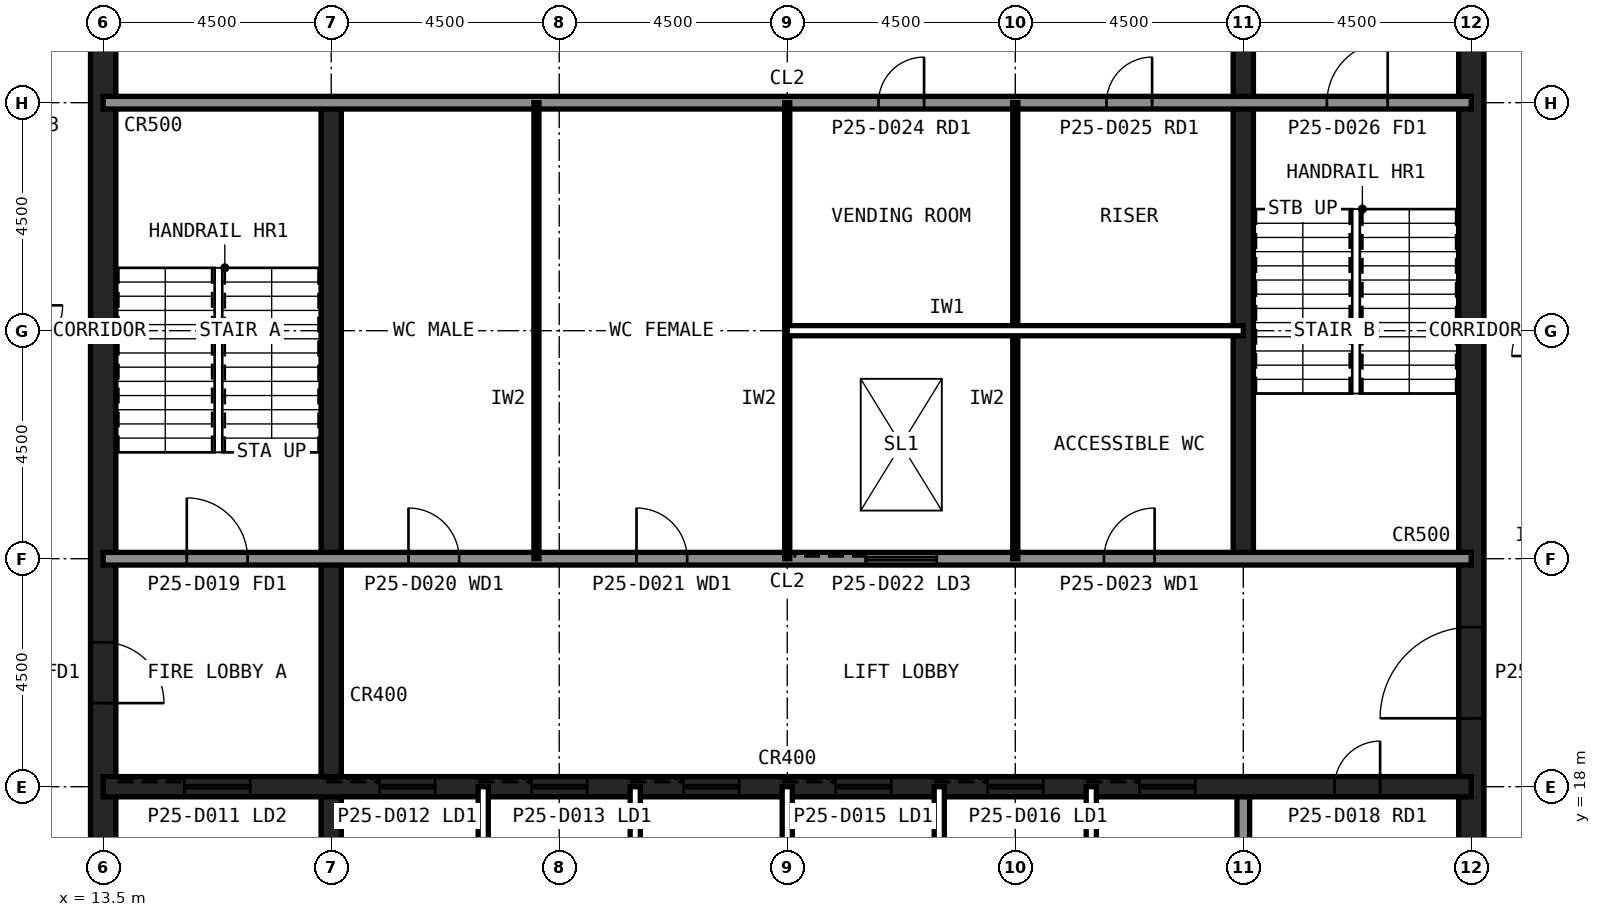
"""IFC4 building model, lengths in metres.
Left out: names, types, materials, properties, quantities, classifications, styles, units other than length and angle.
Written with IfcOpenShell. Run it as: python <this file> out.ifc"""

import sys

from ifc_helpers import new_model, si_unit, direction, frame, frame_2d, origin, place, context, subcontext, project, spatial, rectangle, extrude, element, fill, save


model = new_model("IFC4")
c1 = context("Model", 3, precision=1e-05, world=origin(), true_north=direction((0.0, 1.0)))
c2 = subcontext(c1, "Body", "Model", "MODEL_VIEW")
j1 = project(units=[si_unit("LENGTHUNIT", "METRE"), si_unit("PLANEANGLEUNIT", "RADIAN")], contexts=[c1])
p1 = place(None, origin())
s1 = spatial("IfcSite", under=j1, at=p1, CompositionType="ELEMENT")
p2 = place(p1, origin())
s2 = spatial("IfcBuilding", under=s1, at=p2, CompositionType="ELEMENT")
p3 = place(p2, frame((0.0, 0.0, 110.6)))
s3 = spatial("IfcBuildingStorey", under=s2, at=p3, CompositionType="ELEMENT", Elevation=110.6)
p4 = place(p3, frame((40.5, 13.5, 0.0), z_axis=(0.0, 0.0, 1.0), x_axis=(0.0, 1.0, 0.0)))
e1 = element("IfcWall", 1, at=p4, inside=s3, PredefinedType="SHEAR", context=c2, shape_type="SweptSolid", body=[
    extrude(rectangle(XDim=27.0, YDim=0.5, at=frame_2d((13.5, 0.0))), origin(), (0.0, 0.0, 1.0), 5.0),
])
p5 = place(p4, frame((5.85, 0.0, 0.0)))
e2 = element("IfcOpeningElement", 2, at=p5, cuts=e1, PredefinedType="OPENING", context=c2, shape_type="SweptSolid", body=[
    extrude(rectangle(XDim=1.8, YDim=2.1, at=frame_2d((0.9, 1.05))), frame((0.0, 0.26, 0.0), z_axis=(0.0, -1.0, 0.0), x_axis=(1.0, 0.0, 0.0)), (0.0, 0.0, 1.0), 0.52),
])
p6 = place(p4, frame((19.65, 0.0, 0.0)))
e3 = element("IfcOpeningElement", 3, at=p6, cuts=e1, PredefinedType="OPENING", context=c2, shape_type="SweptSolid", body=[
    extrude(rectangle(XDim=1.2, YDim=2.1, at=frame_2d((0.6, 1.05))), frame((0.0, 0.26, 0.0), z_axis=(0.0, -1.0, 0.0), x_axis=(1.0, 0.0, 0.0)), (0.0, 0.0, 1.0), 0.52),
])
p7 = place(p3, frame((13.5, 40.5, 0.0), z_axis=(0.0, 0.0, 1.0), x_axis=(0.0, -1.0, 0.0)))
e4 = element("IfcWall", 4, at=p7, inside=s3, PredefinedType="SHEAR", context=c2, shape_type="SweptSolid", body=[
    extrude(rectangle(XDim=27.0, YDim=0.5, at=frame_2d((13.5, 0.0))), origin(), (0.0, 0.0, 1.0), 5.0),
])
p8 = place(p7, frame((19.65, 0.0, 0.0)))
e5 = element("IfcOpeningElement", 5, at=p8, cuts=e4, PredefinedType="OPENING", context=c2, shape_type="SweptSolid", body=[
    extrude(rectangle(XDim=1.2, YDim=2.1, at=frame_2d((0.6, 1.05))), frame((0.0, 0.26, 0.0), z_axis=(0.0, -1.0, 0.0), x_axis=(1.0, 0.0, 0.0)), (0.0, 0.0, 1.0), 0.52),
])
p9 = place(p7, frame((5.85, 0.0, 0.0)))
e6 = element("IfcOpeningElement", 6, at=p9, cuts=e4, PredefinedType="OPENING", context=c2, shape_type="SweptSolid", body=[
    extrude(rectangle(XDim=1.8, YDim=2.1, at=frame_2d((0.9, 1.05))), frame((0.0, 0.26, 0.0), z_axis=(0.0, -1.0, 0.0), x_axis=(1.0, 0.0, 0.0)), (0.0, 0.0, 1.0), 0.52),
])
p10 = place(p3, frame((18.0, 13.5, 0.0), z_axis=(0.0, 0.0, 1.0), x_axis=(0.0, 1.0, 0.0)))
e7 = element("IfcWall", 7, at=p10, inside=s3, PredefinedType="SHEAR", context=c2, shape_type="SweptSolid", body=[
    extrude(rectangle(XDim=18.0, YDim=0.4, at=frame_2d((9.0, 0.0))), origin(), (0.0, 0.0, 1.0), 5.0),
])
p11 = place(p3, frame((36.0, 13.5, 0.0), z_axis=(0.0, 0.0, 1.0), x_axis=(0.0, 1.0, 0.0)))
e8 = element("IfcWall", 8, at=p11, inside=s3, PredefinedType="SOLIDWALL", context=c2, shape_type="SweptSolid", body=[
    extrude(rectangle(XDim=4.5, YDim=0.25, at=frame_2d((2.25, 0.0))), origin(), (0.0, 0.0, 1.0), 4.84),
])
p12 = place(p3, frame((36.0, 22.5, 0.0), z_axis=(0.0, 0.0, 1.0), x_axis=(0.0, 1.0, 0.0)))
e9 = element("IfcWall", 9, at=p12, inside=s3, PredefinedType="SHEAR", context=c2, shape_type="SweptSolid", body=[
    extrude(rectangle(XDim=18.0, YDim=0.4, at=frame_2d((9.0, 0.0))), origin(), (0.0, 0.0, 1.0), 5.0),
])
p13 = place(p3, frame((13.5, 18.0, 0.0), z_axis=(0.0, 0.0, 1.0), x_axis=(1.0, 0.0, 0.0)))
e10 = element("IfcWall", 10, at=p13, inside=s3, PredefinedType="SHEAR", context=c2, shape_type="SweptSolid", body=[
    extrude(rectangle(XDim=27.0, YDim=0.4, at=frame_2d((13.5, 0.0))), origin(), (0.0, 0.0, 1.0), 5.0),
])
p14 = place(p13, frame((24.3, 0.0, 0.0)))
e11 = element("IfcOpeningElement", 11, at=p14, cuts=e10, PredefinedType="OPENING", context=c2, shape_type="SweptSolid", body=[
    extrude(rectangle(XDim=0.9, YDim=2.1, at=frame_2d((0.45, 1.05))), frame((0.0, 0.21, 0.0), z_axis=(0.0, -1.0, 0.0), x_axis=(1.0, 0.0, 0.0)), (0.0, 0.0, 1.0), 0.42),
])
p15 = place(p13, frame((5.45, 0.0, 0.0)))
e12 = element("IfcOpeningElement", 12, at=p15, cuts=e10, PredefinedType="OPENING", context=c2, shape_type="SweptSolid", body=[
    extrude(rectangle(XDim=1.1, YDim=2.1, at=frame_2d((0.55, 1.05))), frame((0.0, 0.21, 0.0), z_axis=(0.0, -1.0, 0.0), x_axis=(1.0, 0.0, 0.0)), (0.0, 0.0, 1.0), 0.42),
])
p16 = place(p13, frame((8.45, 0.0, 0.0)))
e13 = element("IfcOpeningElement", 13, at=p16, cuts=e10, PredefinedType="OPENING", context=c2, shape_type="SweptSolid", body=[
    extrude(rectangle(XDim=1.1, YDim=2.1, at=frame_2d((0.55, 1.05))), frame((0.0, 0.21, 0.0), z_axis=(0.0, -1.0, 0.0), x_axis=(1.0, 0.0, 0.0)), (0.0, 0.0, 1.0), 0.42),
])
p17 = place(p13, frame((11.45, 0.0, 0.0)))
e14 = element("IfcOpeningElement", 14, at=p17, cuts=e10, PredefinedType="OPENING", context=c2, shape_type="SweptSolid", body=[
    extrude(rectangle(XDim=1.1, YDim=2.1, at=frame_2d((0.55, 1.05))), frame((0.0, 0.21, 0.0), z_axis=(0.0, -1.0, 0.0), x_axis=(1.0, 0.0, 0.0)), (0.0, 0.0, 1.0), 0.42),
])
p18 = place(p13, frame((14.45, 0.0, 0.0)))
e15 = element("IfcOpeningElement", 15, at=p18, cuts=e10, PredefinedType="OPENING", context=c2, shape_type="SweptSolid", body=[
    extrude(rectangle(XDim=1.1, YDim=2.1, at=frame_2d((0.55, 1.05))), frame((0.0, 0.21, 0.0), z_axis=(0.0, -1.0, 0.0), x_axis=(1.0, 0.0, 0.0)), (0.0, 0.0, 1.0), 0.42),
])
p19 = place(p13, frame((17.45, 0.0, 0.0)))
e16 = element("IfcOpeningElement", 16, at=p19, cuts=e10, PredefinedType="OPENING", context=c2, shape_type="SweptSolid", body=[
    extrude(rectangle(XDim=1.1, YDim=2.1, at=frame_2d((0.55, 1.05))), frame((0.0, 0.21, 0.0), z_axis=(0.0, -1.0, 0.0), x_axis=(1.0, 0.0, 0.0)), (0.0, 0.0, 1.0), 0.42),
])
p20 = place(p13, frame((20.45, 0.0, 0.0)))
e17 = element("IfcOpeningElement", 17, at=p20, cuts=e10, PredefinedType="OPENING", context=c2, shape_type="SweptSolid", body=[
    extrude(rectangle(XDim=1.1, YDim=2.1, at=frame_2d((0.55, 1.05))), frame((0.0, 0.21, 0.0), z_axis=(0.0, -1.0, 0.0), x_axis=(1.0, 0.0, 0.0)), (0.0, 0.0, 1.0), 0.42),
])
p21 = place(p13, frame((1.6, 0.0, 0.0)))
e18 = element("IfcOpeningElement", 18, at=p21, cuts=e10, PredefinedType="OPENING", context=c2, shape_type="SweptSolid", body=[
    extrude(rectangle(XDim=1.3, YDim=2.2, at=frame_2d((0.65, 1.1))), frame((0.0, 0.21, 0.0), z_axis=(0.0, -1.0, 0.0), x_axis=(1.0, 0.0, 0.0)), (0.0, 0.0, 1.0), 0.42),
])
p22 = place(p3, frame((13.5, 22.5, 0.0), z_axis=(0.0, 0.0, 1.0), x_axis=(1.0, 0.0, 0.0)))
e19 = element("IfcWall", 19, at=p22, inside=s3, PredefinedType="SOLIDWALL", context=c2, shape_type="SweptSolid", body=[
    extrude(rectangle(XDim=27.0, YDim=0.25, at=frame_2d((13.5, 0.0))), origin(), (0.0, 0.0, 1.0), 4.84),
])
p23 = place(p22, frame((1.65, 0.0, 0.0)))
e20 = element("IfcOpeningElement", 20, at=p23, cuts=e19, PredefinedType="OPENING", context=c2, shape_type="SweptSolid", body=[
    extrude(rectangle(XDim=1.2, YDim=2.1, at=frame_2d((0.6, 1.05))), frame((0.0, 0.135, 0.0), z_axis=(0.0, -1.0, 0.0), x_axis=(1.0, 0.0, 0.0)), (0.0, 0.0, 1.0), 0.27),
])
p24 = place(p22, frame((6.025, 0.0, 0.0)))
e21 = element("IfcOpeningElement", 21, at=p24, cuts=e19, PredefinedType="OPENING", context=c2, shape_type="SweptSolid", body=[
    extrude(rectangle(XDim=1.0, YDim=2.1, at=frame_2d((0.5, 1.05))), frame((0.0, 0.135, 0.0), z_axis=(0.0, -1.0, 0.0), x_axis=(1.0, 0.0, 0.0)), (0.0, 0.0, 1.0), 0.27),
])
p25 = place(p22, frame((10.525, 0.0, 0.0)))
e22 = element("IfcOpeningElement", 22, at=p25, cuts=e19, PredefinedType="OPENING", context=c2, shape_type="SweptSolid", body=[
    extrude(rectangle(XDim=1.0, YDim=2.1, at=frame_2d((0.5, 1.05))), frame((0.0, 0.135, 0.0), z_axis=(0.0, -1.0, 0.0), x_axis=(1.0, 0.0, 0.0)), (0.0, 0.0, 1.0), 0.27),
])
p26 = place(p22, frame((19.75, 0.0, 0.0)))
e23 = element("IfcOpeningElement", 23, at=p26, cuts=e19, PredefinedType="OPENING", context=c2, shape_type="SweptSolid", body=[
    extrude(rectangle(XDim=1.0, YDim=2.1, at=frame_2d((0.5, 1.05))), frame((0.0, 0.135, 0.0), z_axis=(0.0, -1.0, 0.0), x_axis=(1.0, 0.0, 0.0)), (0.0, 0.0, 1.0), 0.27),
])
p27 = place(p22, frame((15.05, 0.0, 0.0)))
e24 = element("IfcOpeningElement", 24, at=p27, cuts=e19, PredefinedType="OPENING", context=c2, shape_type="SweptSolid", body=[
    extrude(rectangle(XDim=1.4, YDim=2.4, at=frame_2d((0.7, 1.2))), frame((0.0, 0.135, 0.0), z_axis=(0.0, -1.0, 0.0), x_axis=(1.0, 0.0, 0.0)), (0.0, 0.0, 1.0), 0.27),
])
p28 = place(p3, frame((13.5, 31.5, 0.0), z_axis=(0.0, 0.0, 1.0), x_axis=(1.0, 0.0, 0.0)))
e25 = element("IfcWall", 25, at=p28, inside=s3, PredefinedType="SOLIDWALL", context=c2, shape_type="SweptSolid", body=[
    extrude(rectangle(XDim=27.0, YDim=0.25, at=frame_2d((13.5, 0.0))), origin(), (0.0, 0.0, 1.0), 4.84),
])
p29 = place(p28, frame((24.15, 0.0, 0.0)))
e26 = element("IfcOpeningElement", 26, at=p29, cuts=e25, PredefinedType="OPENING", context=c2, shape_type="SweptSolid", body=[
    extrude(rectangle(XDim=1.2, YDim=2.1, at=frame_2d((0.6, 1.05))), frame((0.0, 0.135, 0.0), z_axis=(0.0, -1.0, 0.0), x_axis=(1.0, 0.0, 0.0)), (0.0, 0.0, 1.0), 0.27),
])
p30 = place(p28, frame((15.3, 0.0, 0.0)))
e27 = element("IfcOpeningElement", 27, at=p30, cuts=e25, PredefinedType="OPENING", context=c2, shape_type="SweptSolid", body=[
    extrude(rectangle(XDim=0.9, YDim=2.1, at=frame_2d((0.45, 1.05))), frame((0.0, 0.135, 0.0), z_axis=(0.0, -1.0, 0.0), x_axis=(1.0, 0.0, 0.0)), (0.0, 0.0, 1.0), 0.27),
])
p31 = place(p28, frame((19.8, 0.0, 0.0)))
e28 = element("IfcOpeningElement", 28, at=p31, cuts=e25, PredefinedType="OPENING", context=c2, shape_type="SweptSolid", body=[
    extrude(rectangle(XDim=0.9, YDim=2.1, at=frame_2d((0.45, 1.05))), frame((0.0, 0.135, 0.0), z_axis=(0.0, -1.0, 0.0), x_axis=(1.0, 0.0, 0.0)), (0.0, 0.0, 1.0), 0.27),
])
for number, where, z_axis, x_axis in (
    (29, (21.0, 13.5, 0.0), (0.0, 0.0, 1.0), (0.0, 1.0, 0.0)),
    (30, (24.0, 13.5, 0.0), (0.0, 0.0, 1.0), (0.0, 1.0, 0.0)),
    (31, (27.0, 13.5, 0.0), (0.0, 0.0, 1.0), (0.0, 1.0, 0.0)),
    (32, (30.0, 13.5, 0.0), (0.0, 0.0, 1.0), (0.0, 1.0, 0.0)),
    (33, (33.0, 13.5, 0.0), (0.0, 0.0, 1.0), (0.0, 1.0, 0.0)),
):
    element("IfcWall", number, at=place(p3, frame(where, z_axis=z_axis, x_axis=x_axis)), inside=s3, PredefinedType="PARTITIONING", context=c2, shape_type="SweptSolid", body=[
        extrude(rectangle(XDim=4.5, YDim=0.2, at=frame_2d((2.25, 0.0))), origin(), (0.0, 0.0, 1.0), 4.84),
    ])
for number, where, z_axis, x_axis in (
    (34, (22.05, 22.5, 0.0), (0.0, 0.0, 1.0), (0.0, 1.0, 0.0)),
    (35, (27.0, 22.5, 0.0), (0.0, 0.0, 1.0), (0.0, 1.0, 0.0)),
    (36, (31.5, 22.5, 0.0), (0.0, 0.0, 1.0), (0.0, 1.0, 0.0)),
):
    element("IfcWall", number, at=place(p3, frame(where, z_axis=z_axis, x_axis=x_axis)), inside=s3, PredefinedType="PLUMBINGWALL", context=c2, shape_type="SweptSolid", body=[
        extrude(rectangle(XDim=9.0, YDim=0.1, at=frame_2d((4.5, 0.0))), origin(), (0.0, 0.0, 1.0), 4.84),
    ])
p32 = place(p3, frame((27.0, 27.0, 0.0), z_axis=(0.0, 0.0, 1.0), x_axis=(1.0, 0.0, 0.0)))
e37 = element("IfcWall", 37, at=p32, inside=s3, PredefinedType="PARTITIONING", context=c2, shape_type="SweptSolid", body=[
    extrude(rectangle(XDim=9.0, YDim=0.2, at=frame_2d((4.5, 0.0))), origin(), (0.0, 0.0, 1.0), 4.84),
])
p33 = place(p8, origin())
e38 = element("IfcDoor", 38, at=p33, inside=s3, OperationType="SINGLE_SWING_RIGHT", PredefinedType="DOOR", context=c2, shape_type="SweptSolid", body=[
    extrude(rectangle(XDim=1.2, YDim=2.1, at=frame_2d((0.6, 1.05))), frame((0.0, 0.025, 0.0), z_axis=(0.0, -1.0, 0.0), x_axis=(1.0, 0.0, 0.0)), (0.0, 0.0, 1.0), 0.05),
])
fill(e5, e38)
p34 = place(p5, origin())
e39 = element("IfcDoor", 39, at=p34, inside=s3, OperationType="SINGLE_SWING_LEFT", PredefinedType="DOOR", context=c2, shape_type="SweptSolid", body=[
    extrude(rectangle(XDim=1.8, YDim=2.1, at=frame_2d((0.9, 1.05))), frame((0.0, 0.025, 0.0), z_axis=(0.0, -1.0, 0.0), x_axis=(1.0, 0.0, 0.0)), (0.0, 0.0, 1.0), 0.05),
])
fill(e2, e39)
p35 = place(p23, origin())
e40 = element("IfcDoor", 40, at=p35, inside=s3, OperationType="SINGLE_SWING_LEFT", PredefinedType="DOOR", context=c2, shape_type="SweptSolid", body=[
    extrude(rectangle(XDim=1.2, YDim=2.1, at=frame_2d((0.6, 1.05))), frame((0.0, 0.025, 0.0), z_axis=(0.0, -1.0, 0.0), x_axis=(1.0, 0.0, 0.0)), (0.0, 0.0, 1.0), 0.05),
])
fill(e20, e40)
p36 = place(p29, origin())
e41 = element("IfcDoor", 41, at=p36, inside=s3, OperationType="SINGLE_SWING_RIGHT", PredefinedType="DOOR", context=c2, shape_type="SweptSolid", body=[
    extrude(rectangle(XDim=1.2, YDim=2.1, at=frame_2d((0.6, 1.05))), frame((0.0, 0.025, 0.0), z_axis=(0.0, -1.0, 0.0), x_axis=(1.0, 0.0, 0.0)), (0.0, 0.0, 1.0), 0.05),
])
fill(e26, e41)
p37 = place(p24, origin())
e42 = element("IfcDoor", 42, at=p37, inside=s3, OperationType="SINGLE_SWING_LEFT", PredefinedType="DOOR", context=c2, shape_type="SweptSolid", body=[
    extrude(rectangle(XDim=1.0, YDim=2.1, at=frame_2d((0.5, 1.05))), frame((0.0, 0.025, 0.0), z_axis=(0.0, -1.0, 0.0), x_axis=(1.0, 0.0, 0.0)), (0.0, 0.0, 1.0), 0.05),
])
fill(e21, e42)
p38 = place(p25, origin())
e43 = element("IfcDoor", 43, at=p38, inside=s3, OperationType="SINGLE_SWING_LEFT", PredefinedType="DOOR", context=c2, shape_type="SweptSolid", body=[
    extrude(rectangle(XDim=1.0, YDim=2.1, at=frame_2d((0.5, 1.05))), frame((0.0, 0.025, 0.0), z_axis=(0.0, -1.0, 0.0), x_axis=(1.0, 0.0, 0.0)), (0.0, 0.0, 1.0), 0.05),
])
fill(e22, e43)
p39 = place(p26, origin())
e44 = element("IfcDoor", 44, at=p39, inside=s3, OperationType="SINGLE_SWING_RIGHT", PredefinedType="DOOR", context=c2, shape_type="SweptSolid", body=[
    extrude(rectangle(XDim=1.0, YDim=2.1, at=frame_2d((0.5, 1.05))), frame((0.0, 0.025, 0.0), z_axis=(0.0, -1.0, 0.0), x_axis=(1.0, 0.0, 0.0)), (0.0, 0.0, 1.0), 0.05),
])
fill(e23, e44)
p40 = place(p30, origin())
e45 = element("IfcDoor", 45, at=p40, inside=s3, OperationType="SINGLE_SWING_RIGHT", PredefinedType="DOOR", context=c2, shape_type="SweptSolid", body=[
    extrude(rectangle(XDim=0.9, YDim=2.1, at=frame_2d((0.45, 1.05))), frame((0.0, 0.025, 0.0), z_axis=(0.0, -1.0, 0.0), x_axis=(1.0, 0.0, 0.0)), (0.0, 0.0, 1.0), 0.05),
])
fill(e27, e45)
p41 = place(p31, origin())
e46 = element("IfcDoor", 46, at=p41, inside=s3, OperationType="SINGLE_SWING_RIGHT", PredefinedType="DOOR", context=c2, shape_type="SweptSolid", body=[
    extrude(rectangle(XDim=0.9, YDim=2.1, at=frame_2d((0.45, 1.05))), frame((0.0, 0.025, 0.0), z_axis=(0.0, -1.0, 0.0), x_axis=(1.0, 0.0, 0.0)), (0.0, 0.0, 1.0), 0.05),
])
fill(e28, e46)
p42 = place(p14, origin())
e47 = element("IfcDoor", 47, at=p42, inside=s3, OperationType="SINGLE_SWING_RIGHT", PredefinedType="DOOR", context=c2, shape_type="SweptSolid", body=[
    extrude(rectangle(XDim=0.9, YDim=2.1, at=frame_2d((0.45, 1.05))), frame((0.0, 0.025, 0.0), z_axis=(0.0, -1.0, 0.0), x_axis=(1.0, 0.0, 0.0)), (0.0, 0.0, 1.0), 0.05),
])
fill(e11, e47)
p43 = place(p15, origin())
e48 = element("IfcDoor", 48, at=p43, inside=s3, OperationType="SLIDING_TO_LEFT", PredefinedType="DOOR", context=c2, shape_type="SweptSolid", body=[
    extrude(rectangle(XDim=1.1, YDim=2.1, at=frame_2d((0.55, 1.05))), frame((0.0, 0.025, 0.0), z_axis=(0.0, -1.0, 0.0), x_axis=(1.0, 0.0, 0.0)), (0.0, 0.0, 1.0), 0.05),
])
fill(e12, e48)
p44 = place(p16, origin())
e49 = element("IfcDoor", 49, at=p44, inside=s3, OperationType="SLIDING_TO_LEFT", PredefinedType="DOOR", context=c2, shape_type="SweptSolid", body=[
    extrude(rectangle(XDim=1.1, YDim=2.1, at=frame_2d((0.55, 1.05))), frame((0.0, 0.025, 0.0), z_axis=(0.0, -1.0, 0.0), x_axis=(1.0, 0.0, 0.0)), (0.0, 0.0, 1.0), 0.05),
])
fill(e13, e49)
p45 = place(p17, origin())
e50 = element("IfcDoor", 50, at=p45, inside=s3, OperationType="SLIDING_TO_LEFT", PredefinedType="DOOR", context=c2, shape_type="SweptSolid", body=[
    extrude(rectangle(XDim=1.1, YDim=2.1, at=frame_2d((0.55, 1.05))), frame((0.0, 0.025, 0.0), z_axis=(0.0, -1.0, 0.0), x_axis=(1.0, 0.0, 0.0)), (0.0, 0.0, 1.0), 0.05),
])
fill(e14, e50)
p46 = place(p18, origin())
e51 = element("IfcDoor", 51, at=p46, inside=s3, OperationType="SLIDING_TO_LEFT", PredefinedType="DOOR", context=c2, shape_type="SweptSolid", body=[
    extrude(rectangle(XDim=1.1, YDim=2.1, at=frame_2d((0.55, 1.05))), frame((0.0, 0.025, 0.0), z_axis=(0.0, -1.0, 0.0), x_axis=(1.0, 0.0, 0.0)), (0.0, 0.0, 1.0), 0.05),
])
fill(e15, e51)
p47 = place(p19, origin())
e52 = element("IfcDoor", 52, at=p47, inside=s3, OperationType="SLIDING_TO_LEFT", PredefinedType="DOOR", context=c2, shape_type="SweptSolid", body=[
    extrude(rectangle(XDim=1.1, YDim=2.1, at=frame_2d((0.55, 1.05))), frame((0.0, 0.025, 0.0), z_axis=(0.0, -1.0, 0.0), x_axis=(1.0, 0.0, 0.0)), (0.0, 0.0, 1.0), 0.05),
])
fill(e16, e52)
p48 = place(p20, origin())
e53 = element("IfcDoor", 53, at=p48, inside=s3, OperationType="SLIDING_TO_LEFT", PredefinedType="DOOR", context=c2, shape_type="SweptSolid", body=[
    extrude(rectangle(XDim=1.1, YDim=2.1, at=frame_2d((0.55, 1.05))), frame((0.0, 0.025, 0.0), z_axis=(0.0, -1.0, 0.0), x_axis=(1.0, 0.0, 0.0)), (0.0, 0.0, 1.0), 0.05),
])
fill(e17, e53)
p49 = place(p21, origin())
e54 = element("IfcDoor", 54, at=p49, inside=s3, OperationType="SLIDING_TO_LEFT", PredefinedType="DOOR", context=c2, shape_type="SweptSolid", body=[
    extrude(rectangle(XDim=1.3, YDim=2.2, at=frame_2d((0.65, 1.1))), frame((0.0, 0.025, 0.0), z_axis=(0.0, -1.0, 0.0), x_axis=(1.0, 0.0, 0.0)), (0.0, 0.0, 1.0), 0.05),
])
fill(e18, e54)
p50 = place(p27, origin())
e55 = element("IfcDoor", 55, at=p50, inside=s3, OperationType="SLIDING_TO_LEFT", PredefinedType="DOOR", context=c2, shape_type="SweptSolid", body=[
    extrude(rectangle(XDim=1.4, YDim=2.4, at=frame_2d((0.7, 1.2))), frame((0.0, 0.025, 0.0), z_axis=(0.0, -1.0, 0.0), x_axis=(1.0, 0.0, 0.0)), (0.0, 0.0, 1.0), 0.05),
])
fill(e24, e55)
save(model, sys.argv[1])
